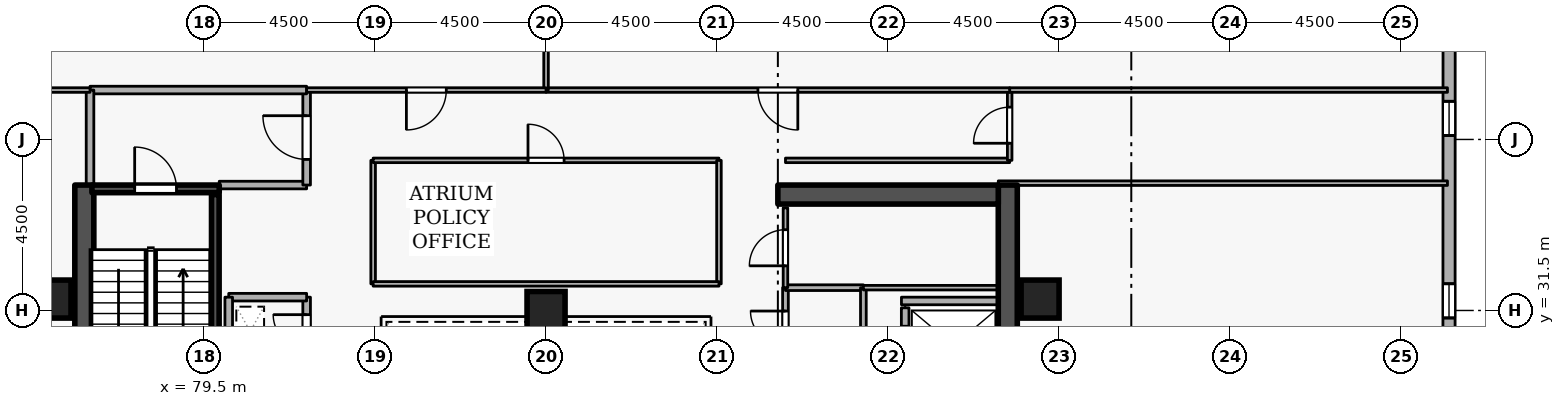
"""IFC4 building model, lengths in metres.
Left out: names, types, materials, properties, quantities, classifications, styles, units other than length and angle.
Written with IfcOpenShell. Run it as: python <this file> out.ifc"""

import sys

from ifc_helpers import new_model, si_unit, direction, frame, frame_2d, origin, origin_2d, place, context, subcontext, project, spatial, rectangle, extrude, element, fill, save


model = new_model("IFC4")
c1 = context("Model", 3, precision=1e-05, world=origin(), true_north=direction((0.0, 1.0)))
c2 = subcontext(c1, "Body", "Model", "MODEL_VIEW")
j1 = project(units=[si_unit("LENGTHUNIT", "METRE"), si_unit("PLANEANGLEUNIT", "RADIAN")], contexts=[c1])
p1 = place(None, origin())
s1 = spatial("IfcSite", under=j1, at=p1, CompositionType="ELEMENT")
p2 = place(p1, origin())
s2 = spatial("IfcBuilding", under=s1, at=p2, CompositionType="ELEMENT")
p3 = place(p2, frame((0.0, 0.0, 229.5)))
s3 = spatial("IfcBuildingStorey", under=s2, at=p3, CompositionType="ELEMENT", Elevation=229.5)
p4 = place(p3, frame((100.65, 19.2, 0.0), z_axis=(0.0, 0.0, 1.0), x_axis=(0.0, 1.0, 0.0)))
e1 = element("IfcWall", 1, at=p4, inside=s3, PredefinedType="SHEAR", context=c2, shape_type="SweptSolid", body=[
    extrude(rectangle(XDim=15.6, YDim=0.5, at=frame_2d((7.8, 0.0))), origin(), (0.0, 0.0, 1.0), 3.6),
])
p5 = place(p3, frame((94.6, 34.55, 0.0), z_axis=(0.0, 0.0, 1.0), x_axis=(1.0, 0.0, 0.0)))
e2 = element("IfcWall", 2, at=p5, inside=s3, PredefinedType="SHEAR", context=c2, shape_type="SweptSolid", body=[
    extrude(rectangle(XDim=5.8, YDim=0.5, at=frame_2d((2.9, 0.0))), origin(), (0.0, 0.0, 1.0), 3.6),
])
p6 = place(p3, frame((76.35, 19.2, 0.0), z_axis=(0.0, 0.0, 1.0), x_axis=(0.0, 1.0, 0.0)))
e3 = element("IfcWall", 3, at=p6, inside=s3, PredefinedType="SHEAR", context=c2, shape_type="SweptSolid", body=[
    extrude(rectangle(XDim=15.6, YDim=0.5, at=frame_2d((7.8, 0.0))), origin(), (0.0, 0.0, 1.0), 3.6),
])
for number, where, z_axis, x_axis in (
    (4, (101.5, 31.8, 0.0), (0.0, 0.0, 1.0), (1.0, 0.0, 0.0)),
    (5, (75.5, 31.8, 0.0), (0.0, 0.0, 1.0), (1.0, 0.0, 0.0)),
    (6, (88.5, 31.5, 0.0), (0.0, 0.0, 1.0), (1.0, 0.0, 0.0)),
):
    element("IfcColumn", number, at=place(p3, frame(where, z_axis=z_axis, x_axis=x_axis)), inside=s3, PredefinedType="COLUMN", context=c2, shape_type="SweptSolid", body=[
        extrude(rectangle(XDim=1.0, YDim=1.0, at=origin_2d()), origin(), (0.0, 0.0, 1.0), 3.6),
    ])
p7 = place(p3, frame((112.253, 9.404, 0.0), z_axis=(0.0, 0.0, 1.0), x_axis=(0.000364968916, 0.999999933399, 0.0)))
e7 = element("IfcWall", 7, at=p7, inside=s3, PredefinedType="STANDARD", context=c2, shape_type="SweptSolid", body=[
    extrude(rectangle(XDim=32.778, YDim=0.32, at=frame_2d((16.389, 0.0))), origin(), (0.0, 0.0, 1.0), 2.7),
])
p8 = place(p7, frame((2.7, 0.0, 0.72)))
e8 = element("IfcOpeningElement", 8, at=p8, cuts=e7, PredefinedType="OPENING", context=c2, shape_type="SweptSolid", body=[
    extrude(rectangle(XDim=0.9, YDim=1.75, at=frame_2d((0.45, 0.875))), frame((0.0, 0.17, 0.0), z_axis=(0.0, -1.0, 0.0), x_axis=(1.0, 0.0, 0.0)), (0.0, 0.0, 1.0), 0.34),
])
p9 = place(p7, frame((12.3, 0.0, 0.72)))
e9 = element("IfcOpeningElement", 9, at=p9, cuts=e7, PredefinedType="OPENING", context=c2, shape_type="SweptSolid", body=[
    extrude(rectangle(XDim=0.9, YDim=1.75, at=frame_2d((0.45, 0.875))), frame((0.0, 0.17, 0.0), z_axis=(0.0, -1.0, 0.0), x_axis=(1.0, 0.0, 0.0)), (0.0, 0.0, 1.0), 0.34),
])
p10 = place(p7, frame((17.1, 0.0, 0.72)))
e10 = element("IfcOpeningElement", 10, at=p10, cuts=e7, PredefinedType="OPENING", context=c2, shape_type="SweptSolid", body=[
    extrude(rectangle(XDim=0.9, YDim=1.75, at=frame_2d((0.45, 0.875))), frame((0.0, 0.17, 0.0), z_axis=(0.0, -1.0, 0.0), x_axis=(1.0, 0.0, 0.0)), (0.0, 0.0, 1.0), 0.34),
])
p11 = place(p7, frame((21.9, 0.0, 0.72)))
e11 = element("IfcOpeningElement", 11, at=p11, cuts=e7, PredefinedType="OPENING", context=c2, shape_type="SweptSolid", body=[
    extrude(rectangle(XDim=0.9, YDim=1.75, at=frame_2d((0.45, 0.875))), frame((0.0, 0.17, 0.0), z_axis=(0.0, -1.0, 0.0), x_axis=(1.0, 0.0, 0.0)), (0.0, 0.0, 1.0), 0.34),
])
p12 = place(p7, frame((26.7, 0.0, 0.72)))
e12 = element("IfcOpeningElement", 12, at=p12, cuts=e7, PredefinedType="OPENING", context=c2, shape_type="SweptSolid", body=[
    extrude(rectangle(XDim=0.9, YDim=1.75, at=frame_2d((0.45, 0.875))), frame((0.0, 0.17, 0.0), z_axis=(0.0, -1.0, 0.0), x_axis=(1.0, 0.0, 0.0)), (0.0, 0.0, 1.0), 0.34),
])
p13 = place(p3, frame((97.95, 31.57, 0.0), z_axis=(0.0, 0.0, 1.0), x_axis=(0.0, -1.0, 0.0)))
e13 = element("IfcWall", 13, at=p13, inside=s3, PredefinedType="STANDARD", context=c2, shape_type="SweptSolid", body=[
    extrude(rectangle(XDim=1.99, YDim=0.2, at=frame_2d((0.995, 0.0))), origin(), (0.0, 0.0, 1.0), 3.3),
])
p14 = place(p13, frame((0.485, 0.0, 0.0)))
e14 = element("IfcOpeningElement", 14, at=p14, cuts=e13, PredefinedType="OPENING", context=c2, shape_type="SweptSolid", body=[
    extrude(rectangle(XDim=1.02, YDim=2.06, at=frame_2d((0.51, 1.03))), frame((0.0, 0.11, 0.0), z_axis=(0.0, -1.0, 0.0), x_axis=(1.0, 0.0, 0.0)), (0.0, 0.0, 1.0), 0.22),
])
p15 = place(p3, frame((97.852, 31.75, 0.0), z_axis=(0.0, 0.0, 1.0), x_axis=(1.0, 0.0, 0.0)))
e15 = element("IfcWall", 15, at=p15, inside=s3, PredefinedType="STANDARD", context=c2, shape_type="SweptSolid", body=[
    extrude(rectangle(XDim=2.536, YDim=0.2, at=frame_2d((1.268, 0.0))), origin(), (0.0, 0.0, 1.0), 3.3),
])
p16 = place(p3, frame((76.55, 34.7, 0.0), z_axis=(0.0, 0.0, 1.0), x_axis=(1.0, 0.0, 0.0)))
e16 = element("IfcWall", 16, at=p16, inside=s3, PredefinedType="SHEAR", context=c2, shape_type="SweptSolid", body=[
    extrude(rectangle(XDim=3.35, YDim=0.2, at=frame_2d((1.675, 0.0))), origin(), (0.0, 0.0, 1.0), 3.6),
])
p17 = place(p16, frame((1.125, 0.0, 0.0)))
e17 = element("IfcOpeningElement", 17, at=p17, cuts=e16, PredefinedType="OPENING", context=c2, shape_type="SweptSolid", body=[
    extrude(rectangle(XDim=1.1, YDim=2.1, at=frame_2d((0.55, 1.05))), frame((0.0, 0.11, 0.0), z_axis=(0.0, -1.0, 0.0), x_axis=(1.0, 0.0, 0.0)), (0.0, 0.0, 1.0), 0.22),
])
p18 = place(p3, frame((79.797, 27.45, 0.0), z_axis=(0.0, 0.0, 1.0), x_axis=(0.0, 1.0, 0.0)))
e18 = element("IfcWall", 18, at=p18, inside=s3, PredefinedType="SHEAR", context=c2, shape_type="SweptSolid", body=[
    extrude(rectangle(XDim=7.1, YDim=0.2, at=frame_2d((3.55, 0.0))), origin(), (0.0, 0.0, 1.0), 3.6),
])
p19 = place(p3, frame((79.9, 34.8, 0.0), z_axis=(0.0, 0.0, 1.0), x_axis=(1.0, 0.0, 0.0)))
e19 = element("IfcWall", 19, at=p19, inside=s3, PredefinedType="STANDARD", context=c2, shape_type="SweptSolid", body=[
    extrude(rectangle(XDim=2.3, YDim=0.2, at=frame_2d((1.15, 0.0))), origin(), (0.0, 0.0, 1.0), 2.505),
])
p20 = place(p3, frame((82.2, 34.8, 0.0), z_axis=(0.0, 0.0, 1.0), x_axis=(0.0, 1.0, 0.0)))
e20 = element("IfcWall", 20, at=p20, inside=s3, PredefinedType="STANDARD", context=c2, shape_type="SweptSolid", body=[
    extrude(rectangle(XDim=2.5, YDim=0.2, at=frame_2d((1.25, 0.0))), origin(), (0.0, 0.0, 1.0), 3.3),
])
p21 = place(p20, frame((0.675, 0.0, 0.0)))
e21 = element("IfcOpeningElement", 21, at=p21, cuts=e20, PredefinedType="OPENING", context=c2, shape_type="SweptSolid", body=[
    extrude(rectangle(XDim=1.15, YDim=2.1, at=frame_2d((0.575, 1.05))), frame((0.0, 0.11, 0.0), z_axis=(0.0, -1.0, 0.0), x_axis=(1.0, 0.0, 0.0)), (0.0, 0.0, 1.0), 0.22),
])
p22 = place(p3, frame((82.2, 37.3, 0.0), z_axis=(0.0, 0.0, 1.0), x_axis=(-1.0, 0.0, 0.0)))
e22 = element("IfcWall", 22, at=p22, inside=s3, PredefinedType="STANDARD", context=c2, shape_type="SweptSolid", body=[
    extrude(rectangle(XDim=5.7, YDim=0.2, at=frame_2d((2.85, 0.0))), origin(), (0.0, 0.0, 1.0), 3.3),
])
p23 = place(p3, frame((76.5, 37.3, 0.0), z_axis=(0.0, 0.0, 1.0), x_axis=(0.0, -1.0, 0.0)))
e23 = element("IfcWall", 23, at=p23, inside=s3, PredefinedType="STANDARD", context=c2, shape_type="SweptSolid", body=[
    extrude(rectangle(XDim=2.5, YDim=0.2, at=frame_2d((1.25, 0.0))), origin(), (0.0, 0.0, 1.0), 3.3),
])
p24 = place(p3, frame((82.2, 30.05, 0.0), z_axis=(0.0, 0.0, 1.0), x_axis=(0.0, 1.0, 0.0)))
e24 = element("IfcWall", 24, at=p24, inside=s3, PredefinedType="STANDARD", context=c2, shape_type="SweptSolid", body=[
    extrude(rectangle(XDim=1.8, YDim=0.2, at=frame_2d((0.9, 0.0))), origin(), (0.0, 0.0, 1.0), 3.3),
])
p25 = place(p24, frame((0.46, 0.0, 0.0)))
e25 = element("IfcOpeningElement", 25, at=p25, cuts=e24, PredefinedType="OPENING", context=c2, shape_type="SweptSolid", body=[
    extrude(rectangle(XDim=0.88, YDim=2.04, at=frame_2d((0.44, 1.02))), frame((0.0, 0.11, 0.0), z_axis=(0.0, -1.0, 0.0), x_axis=(1.0, 0.0, 0.0)), (0.0, 0.0, 1.0), 0.22),
])
p26 = place(p3, frame((82.2, 31.85, 0.0), z_axis=(0.0, 0.0, 1.0), x_axis=(-1.0, 0.0, 0.0)))
e26 = element("IfcWall", 26, at=p26, inside=s3, PredefinedType="STANDARD", context=c2, shape_type="SweptSolid", body=[
    extrude(rectangle(XDim=2.05, YDim=0.2, at=frame_2d((1.025, 0.0))), origin(), (0.0, 0.0, 1.0), 3.3),
])
p27 = place(p3, frame((80.15, 31.85, 0.0), z_axis=(0.0, 0.0, 1.0), x_axis=(0.0, -1.0, 0.0)))
e27 = element("IfcWall", 27, at=p27, inside=s3, PredefinedType="STANDARD", context=c2, shape_type="SweptSolid", body=[
    extrude(rectangle(XDim=1.8, YDim=0.2, at=frame_2d((0.9, 0.0))), origin(), (0.0, 0.0, 1.0), 3.3),
])
p28 = place(p3, frame((94.8, 29.95, 0.0), z_axis=(0.0, 0.0, 1.0), x_axis=(0.0, 1.0, 0.0)))
e28 = element("IfcWall", 28, at=p28, inside=s3, PredefinedType="PARTITIONING", context=c2, shape_type="SweptSolid", body=[
    extrude(rectangle(XDim=2.15, YDim=0.15, at=frame_2d((1.075, 0.0))), origin(), (0.0, 0.0, 1.0), 3.3),
])
p29 = place(p28, frame((0.615, 0.0, 0.0)))
e29 = element("IfcOpeningElement", 29, at=p29, cuts=e28, PredefinedType="OPENING", context=c2, shape_type="SweptSolid", body=[
    extrude(rectangle(XDim=0.92, YDim=2.08, at=frame_2d((0.46, 1.04))), frame((0.0, 0.085, 0.0), z_axis=(0.0, -1.0, 0.0), x_axis=(1.0, 0.0, 0.0)), (0.0, 0.0, 1.0), 0.17),
])
p30 = place(p3, frame((94.8, 32.1, 0.0), z_axis=(0.0, 0.0, 1.0), x_axis=(1.0, 0.0, 0.0)))
e30 = element("IfcWall", 30, at=p30, inside=s3, PredefinedType="PARTITIONING", context=c2, shape_type="SweptSolid", body=[
    extrude(rectangle(XDim=2.05, YDim=0.15, at=frame_2d((1.025, 0.0))), origin(), (0.0, 0.0, 1.0), 3.3),
])
p31 = place(p3, frame((96.85, 32.1, 0.0), z_axis=(0.0, 0.0, 1.0), x_axis=(0.0, -1.0, 0.0)))
e31 = element("IfcWall", 31, at=p31, inside=s3, PredefinedType="PARTITIONING", context=c2, shape_type="SweptSolid", body=[
    extrude(rectangle(XDim=2.15, YDim=0.15, at=frame_2d((1.075, 0.0))), origin(), (0.0, 0.0, 1.0), 3.3),
])
p32 = place(p3, frame((94.8, 32.1, 0.0), z_axis=(0.0, 0.0, 1.0), x_axis=(0.0, 1.0, 0.0)))
e32 = element("IfcWall", 32, at=p32, inside=s3, PredefinedType="PARTITIONING", context=c2, shape_type="SweptSolid", body=[
    extrude(rectangle(XDim=2.1, YDim=0.12, at=frame_2d((1.05, 0.0))), origin(), (0.0, 0.0, 1.0), 3.3),
])
p33 = place(p32, frame((0.575, 0.0, 0.0)))
e33 = element("IfcOpeningElement", 33, at=p33, cuts=e32, PredefinedType="OPENING", context=c2, shape_type="SweptSolid", body=[
    extrude(rectangle(XDim=0.95, YDim=2.1, at=frame_2d((0.475, 1.05))), frame((0.0, 0.07, 0.0), z_axis=(0.0, -1.0, 0.0), x_axis=(1.0, 0.0, 0.0)), (0.0, 0.0, 1.0), 0.14),
])
p34 = place(p3, frame((100.4, 32.1, 0.0), z_axis=(0.0, 0.0, 1.0), x_axis=(-1.0, 0.0, 0.0)))
e34 = element("IfcWall", 34, at=p34, inside=s3, PredefinedType="PARTITIONING", context=c2, shape_type="SweptSolid", body=[
    extrude(rectangle(XDim=3.55, YDim=0.12, at=frame_2d((1.775, 0.0))), origin(), (0.0, 0.0, 1.0), 3.3),
])
p35 = place(p3, frame((94.8, 35.45, 0.0), z_axis=(0.0, 0.0, 1.0), x_axis=(1.0, 0.0, 0.0)))
e35 = element("IfcWall", 35, at=p35, inside=s3, PredefinedType="PARTITIONING", context=c2, shape_type="SweptSolid", body=[
    extrude(rectangle(XDim=5.9, YDim=0.12, at=frame_2d((2.95, 0.0))), origin(), (0.0, 0.0, 1.0), 3.3),
])
p36 = place(p3, frame((100.7, 35.45, 0.0), z_axis=(0.0, 0.0, 1.0), x_axis=(0.0, 1.0, 0.0)))
e36 = element("IfcWall", 36, at=p36, inside=s3, PredefinedType="PARTITIONING", context=c2, shape_type="SweptSolid", body=[
    extrude(rectangle(XDim=1.85, YDim=0.12, at=frame_2d((0.925, 0.0))), origin(), (0.0, 0.0, 1.0), 3.3),
])
p37 = place(p36, frame((0.45, 0.0, 0.0)))
e37 = element("IfcOpeningElement", 37, at=p37, cuts=e36, PredefinedType="OPENING", context=c2, shape_type="SweptSolid", body=[
    extrude(rectangle(XDim=0.95, YDim=2.1, at=frame_2d((0.475, 1.05))), frame((0.0, 0.07, 0.0), z_axis=(0.0, -1.0, 0.0), x_axis=(1.0, 0.0, 0.0)), (0.0, 0.0, 1.0), 0.14),
])
p38 = place(p3, frame((100.7, 37.3, 0.0), z_axis=(0.0, 0.0, 1.0), x_axis=(1.0, 0.0, 0.0)))
e38 = element("IfcWall", 38, at=p38, inside=s3, PredefinedType="PARTITIONING", context=c2, shape_type="SweptSolid", body=[
    extrude(rectangle(XDim=11.52, YDim=0.12, at=frame_2d((5.76, 0.0))), origin(), (0.0, 0.0, 1.0), 3.3),
])
p39 = place(p3, frame((112.22, 34.85, 0.0), z_axis=(0.0, 0.0, 1.0), x_axis=(-1.0, 0.0, 0.0)))
e39 = element("IfcWall", 39, at=p39, inside=s3, PredefinedType="PARTITIONING", context=c2, shape_type="SweptSolid", body=[
    extrude(rectangle(XDim=11.82, YDim=0.12, at=frame_2d((5.91, 0.0))), origin(), (0.0, 0.0, 1.0), 2.505),
])
p40 = place(p3, frame((100.7, 37.3, 0.0), z_axis=(0.0, 0.0, 1.0), x_axis=(-1.0, 0.0, 0.0)))
e40 = element("IfcWall", 40, at=p40, inside=s3, PredefinedType="PARTITIONING", context=c2, shape_type="SweptSolid", body=[
    extrude(rectangle(XDim=12.2, YDim=0.12, at=frame_2d((6.1, 0.0))), origin(), (0.0, 0.0, 1.0), 3.3),
])
p41 = place(p40, frame((5.575, 0.0, 0.0)))
e41 = element("IfcOpeningElement", 41, at=p41, cuts=e40, PredefinedType="OPENING", context=c2, shape_type="SweptSolid", body=[
    extrude(rectangle(XDim=1.05, YDim=2.1, at=frame_2d((0.525, 1.05))), frame((0.0, 0.07, 0.0), z_axis=(0.0, -1.0, 0.0), x_axis=(1.0, 0.0, 0.0)), (0.0, 0.0, 1.0), 0.14),
])
p42 = place(p3, frame((88.5, 37.3, 0.0), z_axis=(0.0, 0.0, 1.0), x_axis=(0.0, 1.0, 0.0)))
e42 = element("IfcWall", 42, at=p42, inside=s3, PredefinedType="PARTITIONING", context=c2, shape_type="SweptSolid", body=[
    extrude(rectangle(XDim=7.42, YDim=0.12, at=frame_2d((3.71, 0.0))), origin(), (0.0, 0.0, 1.0), 2.892),
])
p43 = place(p3, frame((76.5, 37.3, 0.0), z_axis=(0.0, 0.0, 1.0), x_axis=(-1.0, 0.0, 0.0)))
e43 = element("IfcWall", 43, at=p43, inside=s3, PredefinedType="PARTITIONING", context=c2, shape_type="SweptSolid", body=[
    extrude(rectangle(XDim=5.72, YDim=0.12, at=frame_2d((2.86, 0.0))), origin(), (0.0, 0.0, 1.0), 3.3),
])
p44 = place(p3, frame((88.5, 37.3, 0.0), z_axis=(0.0, 0.0, 1.0), x_axis=(-1.0, 0.0, 0.0)))
e44 = element("IfcWall", 44, at=p44, inside=s3, PredefinedType="PARTITIONING", context=c2, shape_type="SweptSolid", body=[
    extrude(rectangle(XDim=6.3, YDim=0.12, at=frame_2d((3.15, 0.0))), origin(), (0.0, 0.0, 1.0), 3.3),
])
p45 = place(p44, frame((2.625, 0.0, 0.0)))
e45 = element("IfcOpeningElement", 45, at=p45, cuts=e44, PredefinedType="OPENING", context=c2, shape_type="SweptSolid", body=[
    extrude(rectangle(XDim=1.05, YDim=2.1, at=frame_2d((0.525, 1.05))), frame((0.0, 0.07, 0.0), z_axis=(0.0, -1.0, 0.0), x_axis=(1.0, 0.0, 0.0)), (0.0, 0.0, 1.0), 0.14),
])
p46 = place(p3, frame((83.95, 32.2, 0.0), z_axis=(0.0, 0.0, 1.0), x_axis=(0.0, 1.0, 0.0)))
e46 = element("IfcWall", 46, at=p46, inside=s3, PredefinedType="PARTITIONING", context=c2, shape_type="SweptSolid", body=[
    extrude(rectangle(XDim=3.25, YDim=0.12, at=frame_2d((1.625, 0.0))), origin(), (0.0, 0.0, 1.0), 3.3),
])
p47 = place(p3, frame((83.95, 35.45, 0.0), z_axis=(0.0, 0.0, 1.0), x_axis=(1.0, 0.0, 0.0)))
e47 = element("IfcWall", 47, at=p47, inside=s3, PredefinedType="PARTITIONING", context=c2, shape_type="SweptSolid", body=[
    extrude(rectangle(XDim=9.1, YDim=0.12, at=frame_2d((4.55, 0.0))), origin(), (0.0, 0.0, 1.0), 3.3),
])
p48 = place(p47, frame((4.075, 0.0, 0.0)))
e48 = element("IfcOpeningElement", 48, at=p48, cuts=e47, PredefinedType="OPENING", context=c2, shape_type="SweptSolid", body=[
    extrude(rectangle(XDim=0.95, YDim=2.1, at=frame_2d((0.475, 1.05))), frame((0.0, 0.07, 0.0), z_axis=(0.0, -1.0, 0.0), x_axis=(1.0, 0.0, 0.0)), (0.0, 0.0, 1.0), 0.14),
])
p49 = place(p3, frame((93.05, 35.45, 0.0), z_axis=(0.0, 0.0, 1.0), x_axis=(0.0, -1.0, 0.0)))
e49 = element("IfcWall", 49, at=p49, inside=s3, PredefinedType="PARTITIONING", context=c2, shape_type="SweptSolid", body=[
    extrude(rectangle(XDim=3.25, YDim=0.12, at=frame_2d((1.625, 0.0))), origin(), (0.0, 0.0, 1.0), 3.3),
])
p50 = place(p3, frame((93.05, 32.2, 0.0), z_axis=(0.0, 0.0, 1.0), x_axis=(-1.0, 0.0, 0.0)))
e50 = element("IfcWall", 50, at=p50, inside=s3, PredefinedType="PARTITIONING", context=c2, shape_type="SweptSolid", body=[
    extrude(rectangle(XDim=9.1, YDim=0.12, at=frame_2d((4.55, 0.0))), origin(), (0.0, 0.0, 1.0), 3.3),
])
p51 = place(p11, origin())
e51 = element("IfcWindow", 51, at=p51, inside=s3, PartitioningType="SINGLE_PANEL", PredefinedType="WINDOW", context=c2, shape_type="SweptSolid", body=[
    extrude(rectangle(XDim=0.9, YDim=1.75, at=frame_2d((0.45, 0.875))), frame((0.0, 0.03, 0.0), z_axis=(0.0, -1.0, 0.0), x_axis=(1.0, 0.0, 0.0)), (0.0, 0.0, 1.0), 0.06),
])
fill(e11, e51)
p52 = place(p12, origin())
e52 = element("IfcWindow", 52, at=p52, inside=s3, PartitioningType="SINGLE_PANEL", PredefinedType="WINDOW", context=c2, shape_type="SweptSolid", body=[
    extrude(rectangle(XDim=0.9, YDim=1.75, at=frame_2d((0.45, 0.875))), frame((0.0, 0.03, 0.0), z_axis=(0.0, -1.0, 0.0), x_axis=(1.0, 0.0, 0.0)), (0.0, 0.0, 1.0), 0.06),
])
fill(e12, e52)
p53 = place(p17, origin())
e53 = element("IfcDoor", 53, at=p53, inside=s3, OperationType="SINGLE_SWING_LEFT", PredefinedType="DOOR", context=c2, shape_type="SweptSolid", body=[
    extrude(rectangle(XDim=1.1, YDim=2.1, at=frame_2d((0.55, 1.05))), frame((0.0, 0.025, 0.0), z_axis=(0.0, -1.0, 0.0), x_axis=(1.0, 0.0, 0.0)), (0.0, 0.0, 1.0), 0.05),
])
fill(e17, e53)
p54 = place(p21, origin())
e54 = element("IfcDoor", 54, at=p54, inside=s3, OperationType="SINGLE_SWING_RIGHT", PredefinedType="DOOR", context=c2, shape_type="SweptSolid", body=[
    extrude(rectangle(XDim=1.15, YDim=2.1, at=frame_2d((0.575, 1.05))), frame((0.0, 0.025, 0.0), z_axis=(0.0, -1.0, 0.0), x_axis=(1.0, 0.0, 0.0)), (0.0, 0.0, 1.0), 0.05),
])
fill(e21, e54)
p55 = place(p25, origin())
e55 = element("IfcDoor", 55, at=p55, inside=s3, OperationType="SINGLE_SWING_RIGHT", PredefinedType="DOOR", context=c2, shape_type="SweptSolid", body=[
    extrude(rectangle(XDim=0.88, YDim=2.04, at=frame_2d((0.44, 1.02))), frame((0.0, 0.025, 0.0), z_axis=(0.0, -1.0, 0.0), x_axis=(1.0, 0.0, 0.0)), (0.0, 0.0, 1.0), 0.05),
])
fill(e25, e55)
p56 = place(p29, origin())
e56 = element("IfcDoor", 56, at=p56, inside=s3, OperationType="SINGLE_SWING_RIGHT", PredefinedType="DOOR", context=c2, shape_type="SweptSolid", body=[
    extrude(rectangle(XDim=0.92, YDim=2.08, at=frame_2d((0.46, 1.04))), frame((0.0, 0.025, 0.0), z_axis=(0.0, -1.0, 0.0), x_axis=(1.0, 0.0, 0.0)), (0.0, 0.0, 1.0), 0.05),
])
fill(e29, e56)
p57 = place(p33, origin())
e57 = element("IfcDoor", 57, at=p57, inside=s3, OperationType="SINGLE_SWING_LEFT", PredefinedType="DOOR", context=c2, shape_type="SweptSolid", body=[
    extrude(rectangle(XDim=0.95, YDim=2.1, at=frame_2d((0.475, 1.05))), frame((0.0, 0.025, 0.0), z_axis=(0.0, -1.0, 0.0), x_axis=(1.0, 0.0, 0.0)), (0.0, 0.0, 1.0), 0.05),
])
fill(e33, e57)
p58 = place(p37, origin())
e58 = element("IfcDoor", 58, at=p58, inside=s3, OperationType="SINGLE_SWING_LEFT", PredefinedType="DOOR", context=c2, shape_type="SweptSolid", body=[
    extrude(rectangle(XDim=0.95, YDim=2.1, at=frame_2d((0.475, 1.05))), frame((0.0, 0.025, 0.0), z_axis=(0.0, -1.0, 0.0), x_axis=(1.0, 0.0, 0.0)), (0.0, 0.0, 1.0), 0.05),
])
fill(e37, e58)
p59 = place(p41, origin())
e59 = element("IfcDoor", 59, at=p59, inside=s3, OperationType="SINGLE_SWING_LEFT", PredefinedType="DOOR", context=c2, shape_type="SweptSolid", body=[
    extrude(rectangle(XDim=1.05, YDim=2.1, at=frame_2d((0.525, 1.05))), frame((0.0, 0.025, 0.0), z_axis=(0.0, -1.0, 0.0), x_axis=(1.0, 0.0, 0.0)), (0.0, 0.0, 1.0), 0.05),
])
fill(e41, e59)
p60 = place(p45, origin())
e60 = element("IfcDoor", 60, at=p60, inside=s3, OperationType="SINGLE_SWING_RIGHT", PredefinedType="DOOR", context=c2, shape_type="SweptSolid", body=[
    extrude(rectangle(XDim=1.05, YDim=2.1, at=frame_2d((0.525, 1.05))), frame((0.0, 0.025, 0.0), z_axis=(0.0, -1.0, 0.0), x_axis=(1.0, 0.0, 0.0)), (0.0, 0.0, 1.0), 0.05),
])
fill(e45, e60)
p61 = place(p48, origin())
e61 = element("IfcDoor", 61, at=p61, inside=s3, OperationType="SINGLE_SWING_LEFT", PredefinedType="DOOR", context=c2, shape_type="SweptSolid", body=[
    extrude(rectangle(XDim=0.95, YDim=2.1, at=frame_2d((0.475, 1.05))), frame((0.0, 0.025, 0.0), z_axis=(0.0, -1.0, 0.0), x_axis=(1.0, 0.0, 0.0)), (0.0, 0.0, 1.0), 0.05),
])
fill(e48, e61)
save(model, sys.argv[1])
